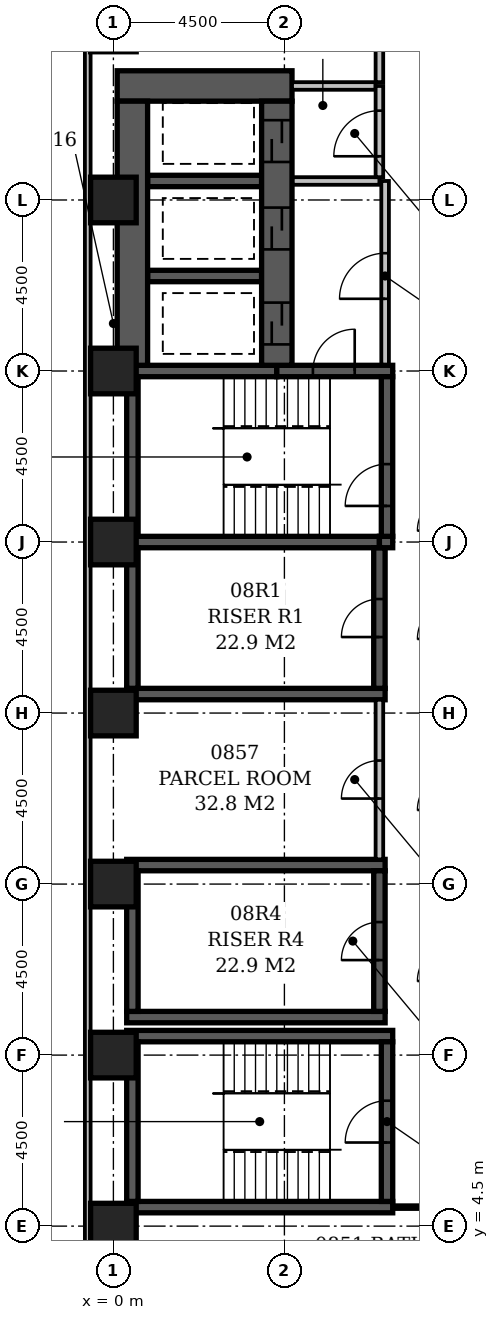
"""IFC4 building model, lengths in metres.
Left out: names, types, materials, properties, quantities, classifications, styles, units other than length and angle.
Written with IfcOpenShell. Run it as: python <this file> out.ifc"""

import sys

from ifc_helpers import new_model, si_unit, direction, frame, frame_2d, origin, origin_2d, place, context, subcontext, project, spatial, rectangle, extrude, element, fill, save


model = new_model("IFC4")
c1 = context("Model", 3, precision=1e-05, world=origin(), true_north=direction((0.0, 1.0)))
c2 = subcontext(c1, "Body", "Model", "MODEL_VIEW")
j1 = project(units=[si_unit("LENGTHUNIT", "METRE"), si_unit("PLANEANGLEUNIT", "RADIAN")], contexts=[c1])
p1 = place(None, origin())
s1 = spatial("IfcSite", under=j1, at=p1, CompositionType="ELEMENT")
p2 = place(p1, origin())
s2 = spatial("IfcBuilding", under=s1, at=p2, CompositionType="ELEMENT")
p3 = place(p2, frame((0.0, 0.0, 39.8)))
s3 = spatial("IfcBuildingStorey", under=s2, at=p3, CompositionType="ELEMENT", Elevation=39.8)
p4 = place(p3, frame((0.1, 34.5, -0.3), z_axis=(0.0, 0.0, 1.0), x_axis=(1.0, 0.0, 0.0)))
e1 = element("IfcWall", 1, at=p4, inside=s3, PredefinedType="SHEAR", context=c2, shape_type="SweptSolid", body=[
    extrude(rectangle(XDim=4.6, YDim=0.8, at=frame_2d((2.3, 0.0))), origin(), (0.0, 0.0, 1.0), 3.6),
])
for number, where, z_axis, x_axis in (
    (2, (0.35, 5.0, -0.3), (0.0, 0.0, 1.0), (1.0, 0.0, 0.0)),
    (3, (0.35, 9.5, -0.3), (0.0, 0.0, 1.0), (1.0, 0.0, 0.0)),
):
    element("IfcWall", number, at=place(p3, frame(where, z_axis=z_axis, x_axis=x_axis)), inside=s3, PredefinedType="SHEAR", context=c2, shape_type="SweptSolid", body=[
        extrude(rectangle(XDim=7.0, YDim=0.3, at=frame_2d((3.5, 0.0))), origin(), (0.0, 0.0, 1.0), 3.6),
    ])
for number, where, z_axis, x_axis in (
    (4, (0.35, 10.0, -0.3), (0.0, 0.0, 1.0), (1.0, 0.0, 0.0)),
    (5, (0.35, 14.0, -0.3), (0.0, 0.0, 1.0), (1.0, 0.0, 0.0)),
    (6, (0.35, 18.5, -0.3), (0.0, 0.0, 1.0), (1.0, 0.0, 0.0)),
):
    element("IfcWall", number, at=place(p3, frame(where, z_axis=z_axis, x_axis=x_axis)), inside=s3, PredefinedType="SHEAR", context=c2, shape_type="SweptSolid", body=[
        extrude(rectangle(XDim=6.8, YDim=0.3, at=frame_2d((3.4, 0.0))), origin(), (0.0, 0.0, 1.0), 3.6),
    ])
p5 = place(p3, frame((0.35, 22.5, -0.3), z_axis=(0.0, 0.0, 1.0), x_axis=(1.0, 0.0, 0.0)))
e7 = element("IfcWall", 7, at=p5, inside=s3, PredefinedType="SHEAR", context=c2, shape_type="SweptSolid", body=[
    extrude(rectangle(XDim=6.65, YDim=0.3, at=frame_2d((3.325, 0.0))), origin(), (0.0, 0.0, 1.0), 3.6),
])
p6 = place(p3, frame((0.35, 27.0, -0.3), z_axis=(0.0, 0.0, 1.0), x_axis=(1.0, 0.0, 0.0)))
e8 = element("IfcWall", 8, at=p6, inside=s3, PredefinedType="SHEAR", context=c2, shape_type="SweptSolid", body=[
    extrude(rectangle(XDim=3.95, YDim=0.3, at=frame_2d((1.975, 0.0))), origin(), (0.0, 0.0, 1.0), 3.6),
])
p7 = place(p3, frame((0.5, 5.15, -0.3), z_axis=(0.0, 0.0, 1.0), x_axis=(0.0, 1.0, 0.0)))
e9 = element("IfcWall", 9, at=p7, inside=s3, PredefinedType="SHEAR", context=c2, shape_type="SweptSolid", body=[
    extrude(rectangle(XDim=4.2, YDim=0.3, at=frame_2d((2.1, 0.0))), origin(), (0.0, 0.0, 1.0), 3.6),
])
for number, where, z_axis, x_axis in (
    (10, (0.5, 10.15, -0.3), (0.0, 0.0, 1.0), (0.0, 1.0, 0.0)),
    (11, (0.5, 18.65, -0.3), (0.0, 0.0, 1.0), (0.0, 1.0, 0.0)),
):
    element("IfcWall", number, at=place(p3, frame(where, z_axis=z_axis, x_axis=x_axis)), inside=s3, PredefinedType="SHEAR", context=c2, shape_type="SweptSolid", body=[
        extrude(rectangle(XDim=3.7, YDim=0.3, at=frame_2d((1.85, 0.0))), origin(), (0.0, 0.0, 1.0), 3.6),
    ])
p8 = place(p3, frame((0.5, 22.65, -0.3), z_axis=(0.0, 0.0, 1.0), x_axis=(0.0, 1.0, 0.0)))
e12 = element("IfcWall", 12, at=p8, inside=s3, PredefinedType="SHEAR", context=c2, shape_type="SweptSolid", body=[
    extrude(rectangle(XDim=4.2, YDim=0.3, at=frame_2d((2.1, 0.0))), origin(), (0.0, 0.0, 1.0), 3.6),
])
p9 = place(p3, frame((0.5, 27.15, -0.3), z_axis=(0.0, 0.0, 1.0), x_axis=(0.0, 1.0, 0.0)))
e13 = element("IfcWall", 13, at=p9, inside=s3, PredefinedType="SHEAR", context=c2, shape_type="SweptSolid", body=[
    extrude(rectangle(XDim=6.95, YDim=0.8, at=frame_2d((3.475, 0.0))), origin(), (0.0, 0.0, 1.0), 3.6),
])
for number, where, z_axis, x_axis in (
    (14, (0.9, 29.5, -0.3), (0.0, 0.0, 1.0), (1.0, 0.0, 0.0)),
    (15, (0.9, 32.0, -0.3), (0.0, 0.0, 1.0), (1.0, 0.0, 0.0)),
):
    element("IfcWall", number, at=place(p3, frame(where, z_axis=z_axis, x_axis=x_axis)), inside=s3, PredefinedType="SHEAR", context=c2, shape_type="SweptSolid", body=[
        extrude(rectangle(XDim=3.0, YDim=0.3, at=frame_2d((1.5, 0.0))), origin(), (0.0, 0.0, 1.0), 3.6),
    ])
p10 = place(p3, frame((4.3, 27.0, -0.3), z_axis=(0.0, 0.0, 1.0), x_axis=(1.0, 0.0, 0.0)))
e16 = element("IfcWall", 16, at=p10, inside=s3, PredefinedType="SHEAR", context=c2, shape_type="SweptSolid", body=[
    extrude(rectangle(XDim=3.05, YDim=0.3, at=frame_2d((1.525, 0.0))), origin(), (0.0, 0.0, 1.0), 3.6),
])
p11 = place(p10, frame((0.95, 0.0, 0.3)))
e17 = element("IfcOpeningElement", 17, at=p11, cuts=e16, PredefinedType="OPENING", context=c2, shape_type="SweptSolid", body=[
    extrude(rectangle(XDim=1.1, YDim=2.1, at=frame_2d((0.55, 1.05))), frame((0.0, 0.162, 0.0), z_axis=(0.0, -1.0, 0.0), x_axis=(1.0, 0.0, 0.0)), (0.0, 0.0, 1.0), 0.324),
])
p12 = place(p3, frame((4.3, 27.15, -0.3), z_axis=(0.0, 0.0, 1.0), x_axis=(0.0, 1.0, 0.0)))
e18 = element("IfcWall", 18, at=p12, inside=s3, PredefinedType="SHEAR", context=c2, shape_type="SweptSolid", body=[
    extrude(rectangle(XDim=6.95, YDim=0.8, at=frame_2d((3.475, 0.0))), origin(), (0.0, 0.0, 1.0), 3.6),
])
p13 = place(p12, frame((3.05, 0.0, 0.3)))
e19 = element("IfcOpeningElement", 19, at=p13, cuts=e18, PredefinedType="OPENING", context=c2, shape_type="SweptSolid", body=[
    extrude(rectangle(XDim=1.1, YDim=2.1, at=frame_2d((0.55, 1.05))), frame((0.0, 0.412, 0.0), z_axis=(0.0, -1.0, 0.0), x_axis=(1.0, 0.0, 0.0)), (0.0, 0.0, 1.0), 0.824),
])
p14 = place(p12, frame((0.55, 0.0, 0.3)))
e20 = element("IfcOpeningElement", 20, at=p14, cuts=e18, PredefinedType="OPENING", context=c2, shape_type="SweptSolid", body=[
    extrude(rectangle(XDim=1.1, YDim=2.1, at=frame_2d((0.55, 1.05))), frame((0.0, 0.412, 0.0), z_axis=(0.0, -1.0, 0.0), x_axis=(1.0, 0.0, 0.0)), (0.0, 0.0, 1.0), 0.824),
])
p15 = place(p12, frame((5.35, 0.0, 0.3)))
e21 = element("IfcOpeningElement", 21, at=p15, cuts=e18, PredefinedType="OPENING", context=c2, shape_type="SweptSolid", body=[
    extrude(rectangle(XDim=1.1, YDim=2.1, at=frame_2d((0.55, 1.05))), frame((0.0, 0.412, 0.0), z_axis=(0.0, -1.0, 0.0), x_axis=(1.0, 0.0, 0.0)), (0.0, 0.0, 1.0), 0.824),
])
p16 = place(p3, frame((7.0, 10.15, -0.3), z_axis=(0.0, 0.0, 1.0), x_axis=(0.0, 1.0, 0.0)))
e22 = element("IfcWall", 22, at=p16, inside=s3, PredefinedType="SHEAR", context=c2, shape_type="SweptSolid", body=[
    extrude(rectangle(XDim=3.7, YDim=0.3, at=frame_2d((1.85, 0.0))), origin(), (0.0, 0.0, 1.0), 3.6),
])
p17 = place(p16, frame((1.35, 0.0, 0.3)))
e23 = element("IfcOpeningElement", 23, at=p17, cuts=e22, PredefinedType="OPENING", context=c2, shape_type="SweptSolid", body=[
    extrude(rectangle(XDim=1.0, YDim=2.1, at=frame_2d((0.5, 1.05))), frame((0.0, 0.162, 0.0), z_axis=(0.0, -1.0, 0.0), x_axis=(1.0, 0.0, 0.0)), (0.0, 0.0, 1.0), 0.324),
])
p18 = place(p3, frame((7.0, 18.65, -0.3), z_axis=(0.0, 0.0, 1.0), x_axis=(0.0, 1.0, 0.0)))
e24 = element("IfcWall", 24, at=p18, inside=s3, PredefinedType="SHEAR", context=c2, shape_type="SweptSolid", body=[
    extrude(rectangle(XDim=3.7, YDim=0.3, at=frame_2d((1.85, 0.0))), origin(), (0.0, 0.0, 1.0), 3.6),
])
p19 = place(p18, frame((1.35, 0.0, 0.3)))
e25 = element("IfcOpeningElement", 25, at=p19, cuts=e24, PredefinedType="OPENING", context=c2, shape_type="SweptSolid", body=[
    extrude(rectangle(XDim=1.0, YDim=2.1, at=frame_2d((0.5, 1.05))), frame((0.0, 0.162, 0.0), z_axis=(0.0, -1.0, 0.0), x_axis=(1.0, 0.0, 0.0)), (0.0, 0.0, 1.0), 0.324),
])
p20 = place(p3, frame((7.0, 22.5, -0.3), z_axis=(0.0, 0.0, 1.0), x_axis=(1.0, 0.0, 0.0)))
e26 = element("IfcWall", 26, at=p20, inside=s3, PredefinedType="SHEAR", context=c2, shape_type="SweptSolid", body=[
    extrude(rectangle(XDim=0.35, YDim=0.3, at=frame_2d((0.175, 0.0))), origin(), (0.0, 0.0, 1.0), 3.6),
])
p21 = place(p3, frame((7.2, 5.15, -0.3), z_axis=(0.0, 0.0, 1.0), x_axis=(0.0, 1.0, 0.0)))
e27 = element("IfcWall", 27, at=p21, inside=s3, PredefinedType="SHEAR", context=c2, shape_type="SweptSolid", body=[
    extrude(rectangle(XDim=4.2, YDim=0.3, at=frame_2d((2.1, 0.0))), origin(), (0.0, 0.0, 1.0), 3.6),
])
p22 = place(p21, frame((1.55, 0.0, 0.3)))
e28 = element("IfcOpeningElement", 28, at=p22, cuts=e27, PredefinedType="OPENING", context=c2, shape_type="SweptSolid", body=[
    extrude(rectangle(XDim=1.1, YDim=2.1, at=frame_2d((0.55, 1.05))), frame((0.0, 0.162, 0.0), z_axis=(0.0, -1.0, 0.0), x_axis=(1.0, 0.0, 0.0)), (0.0, 0.0, 1.0), 0.324),
])
p23 = place(p3, frame((7.2, 22.65, -0.3), z_axis=(0.0, 0.0, 1.0), x_axis=(0.0, 1.0, 0.0)))
e29 = element("IfcWall", 29, at=p23, inside=s3, PredefinedType="SHEAR", context=c2, shape_type="SweptSolid", body=[
    extrude(rectangle(XDim=4.2, YDim=0.3, at=frame_2d((2.1, 0.0))), origin(), (0.0, 0.0, 1.0), 3.6),
])
p24 = place(p23, frame((0.8, 0.0, 0.3)))
e30 = element("IfcOpeningElement", 30, at=p24, cuts=e29, PredefinedType="OPENING", context=c2, shape_type="SweptSolid", body=[
    extrude(rectangle(XDim=1.1, YDim=2.1, at=frame_2d((0.55, 1.05))), frame((0.0, 0.162, 0.0), z_axis=(0.0, -1.0, 0.0), x_axis=(1.0, 0.0, 0.0)), (0.0, 0.0, 1.0), 0.324),
])
for number, where, z_axis, x_axis in (
    (31, (0.0, 4.5, -0.3), (0.0, 0.0, 1.0), (1.0, 0.0, 0.0)),
    (32, (0.0, 9.0, -0.3), (0.0, 0.0, 1.0), (1.0, 0.0, 0.0)),
    (33, (0.0, 13.5, -0.3), (0.0, 0.0, 1.0), (1.0, 0.0, 0.0)),
    (34, (0.0, 18.0, -0.3), (0.0, 0.0, 1.0), (1.0, 0.0, 0.0)),
    (35, (0.0, 22.5, -0.3), (0.0, 0.0, 1.0), (1.0, 0.0, 0.0)),
    (36, (0.0, 27.0, -0.3), (0.0, 0.0, 1.0), (1.0, 0.0, 0.0)),
    (37, (0.0, 31.5, -0.3), (0.0, 0.0, 1.0), (1.0, 0.0, 0.0)),
):
    element("IfcColumn", number, at=place(p3, frame(where, z_axis=z_axis, x_axis=x_axis)), inside=s3, PredefinedType="COLUMN", context=c2, shape_type="SweptSolid", body=[
        extrude(rectangle(XDim=1.2, YDim=1.2, at=origin_2d()), origin(), (0.0, 0.0, 1.0), 3.6),
    ])
p25 = place(p3, frame((-0.675, 59.1, 0.0), z_axis=(0.0, 0.0, 1.0), x_axis=(0.0, -1.0, 0.0)))
e38 = element("IfcWall", 38, at=p25, inside=s3, PredefinedType="STANDARD", context=c2, shape_type="SweptSolid", body=[
    extrude(rectangle(XDim=55.35, YDim=0.15, at=frame_2d((27.675, 0.0))), origin(), (0.0, 0.0, 1.0), 2.7),
])
p26 = place(p25, frame((10.65, 0.0, 0.6)))
e39 = element("IfcOpeningElement", 39, at=p26, cuts=e38, PredefinedType="OPENING", context=c2, shape_type="SweptSolid", body=[
    extrude(rectangle(XDim=2.4, YDim=1.8, at=frame_2d((1.2, 0.9))), frame((0.0, 0.087, 0.0), z_axis=(0.0, -1.0, 0.0), x_axis=(1.0, 0.0, 0.0)), (0.0, 0.0, 1.0), 0.174),
])
p27 = place(p25, frame((15.15, 0.0, 0.6)))
e40 = element("IfcOpeningElement", 40, at=p27, cuts=e38, PredefinedType="OPENING", context=c2, shape_type="SweptSolid", body=[
    extrude(rectangle(XDim=2.4, YDim=1.8, at=frame_2d((1.2, 0.9))), frame((0.0, 0.087, 0.0), z_axis=(0.0, -1.0, 0.0), x_axis=(1.0, 0.0, 0.0)), (0.0, 0.0, 1.0), 0.174),
])
p28 = place(p25, frame((19.53, 0.0, 0.6)))
e41 = element("IfcOpeningElement", 41, at=p28, cuts=e38, PredefinedType="OPENING", context=c2, shape_type="SweptSolid", body=[
    extrude(rectangle(XDim=1.5, YDim=1.8, at=frame_2d((0.75, 0.9))), frame((0.0, 0.087, 0.0), z_axis=(0.0, -1.0, 0.0), x_axis=(1.0, 0.0, 0.0)), (0.0, 0.0, 1.0), 0.174),
])
p29 = place(p3, frame((4.72, 32.0, 0.0), z_axis=(0.0, 0.0, 1.0), x_axis=(1.0, 0.0, 0.0)))
e42 = element("IfcWall", 42, at=p29, inside=s3, PredefinedType="PARTITIONING", context=c2, shape_type="SweptSolid", body=[
    extrude(rectangle(XDim=2.28, YDim=0.2, at=frame_2d((1.14, 0.0))), origin(), (0.0, 0.0, 1.0), 3.3),
])
p30 = place(p3, frame((7.0, 32.1, 0.0), z_axis=(0.0, 0.0, 1.0), x_axis=(0.0, 1.0, 0.0)))
e43 = element("IfcWall", 43, at=p30, inside=s3, PredefinedType="PARTITIONING", context=c2, shape_type="SweptSolid", body=[
    extrude(rectangle(XDim=2.4, YDim=0.2, at=frame_2d((1.2, 0.0))), origin(), (0.0, 0.0, 1.0), 3.3),
])
p31 = place(p30, frame((0.55, 0.0, 0.0)))
e44 = element("IfcOpeningElement", 44, at=p31, cuts=e43, PredefinedType="OPENING", context=c2, shape_type="SweptSolid", body=[
    extrude(rectangle(XDim=1.2, YDim=2.1, at=frame_2d((0.6, 1.05))), frame((0.0, 0.112, 0.0), z_axis=(0.0, -1.0, 0.0), x_axis=(1.0, 0.0, 0.0)), (0.0, 0.0, 1.0), 0.224),
])
p32 = place(p3, frame((4.7, 34.5, 0.0), z_axis=(0.0, 0.0, 1.0), x_axis=(1.0, 0.0, 0.0)))
e45 = element("IfcWall", 45, at=p32, inside=s3, PredefinedType="PARTITIONING", context=c2, shape_type="SweptSolid", body=[
    extrude(rectangle(XDim=2.2, YDim=0.2, at=frame_2d((1.1, 0.0))), origin(), (0.0, 0.0, 1.0), 3.3),
])
p33 = place(p3, frame((7.15, 27.17, 0.0), z_axis=(0.0, 0.0, 1.0), x_axis=(0.0, 1.0, 0.0)))
e46 = element("IfcWall", 46, at=p33, inside=s3, PredefinedType="PARTITIONING", context=c2, shape_type="SweptSolid", body=[
    extrude(rectangle(XDim=4.83, YDim=0.2, at=frame_2d((2.415, 0.0))), origin(), (0.0, 0.0, 1.0), 3.3),
])
p34 = place(p33, frame((1.73, 0.0, 0.0)))
e47 = element("IfcOpeningElement", 47, at=p34, cuts=e46, PredefinedType="OPENING", context=c2, shape_type="SweptSolid", body=[
    extrude(rectangle(XDim=1.2, YDim=2.1, at=frame_2d((0.6, 1.05))), frame((0.0, 0.112, 0.0), z_axis=(0.0, -1.0, 0.0), x_axis=(1.0, 0.0, 0.0)), (0.0, 0.0, 1.0), 0.224),
])
p35 = place(p3, frame((0.0, 4.4, 0.0), z_axis=(0.0, 0.0, 1.0), x_axis=(0.0, 1.0, 0.0)))
e48 = element("IfcWall", 48, at=p35, inside=s3, PredefinedType="PARTITIONING", context=c2, shape_type="SweptSolid", body=[
    extrude(rectangle(XDim=0.7, YDim=0.1, at=frame_2d((0.35, 0.0))), origin(), (0.0, 0.0, 1.0), 2.7),
])
p36 = place(p3, frame((7.349, 5.0, 0.0), z_axis=(0.0, 0.0, 1.0), x_axis=(1.0, 0.0, 0.0)))
e49 = element("IfcWall", 49, at=p36, inside=s3, PredefinedType="PARTITIONING", context=c2, shape_type="SweptSolid", body=[
    extrude(rectangle(XDim=1.551, YDim=0.1, at=frame_2d((0.775, 0.0))), origin(), (0.0, 0.0, 1.0), 3.3),
])
p37 = place(p3, frame((7.0, 14.15, 0.0), z_axis=(0.0, 0.0, 1.0), x_axis=(0.0, 1.0, 0.0)))
e50 = element("IfcWall", 50, at=p37, inside=s3, PredefinedType="PARTITIONING", context=c2, shape_type="SweptSolid", body=[
    extrude(rectangle(XDim=4.2, YDim=0.2, at=frame_2d((2.1, 0.0))), origin(), (0.0, 0.0, 1.0), 3.3),
])
p38 = place(p37, frame((1.6, 0.0, 0.0)))
e51 = element("IfcOpeningElement", 51, at=p38, cuts=e50, PredefinedType="OPENING", context=c2, shape_type="SweptSolid", body=[
    extrude(rectangle(XDim=1.0, YDim=2.1, at=frame_2d((0.5, 1.05))), frame((0.0, 0.112, 0.0), z_axis=(0.0, -1.0, 0.0), x_axis=(1.0, 0.0, 0.0)), (0.0, 0.0, 1.0), 0.224),
])
p39 = place(p3, frame((7.0, 34.6, 0.0), z_axis=(0.0, 0.0, 1.0), x_axis=(0.0, 1.0, 0.0)))
e52 = element("IfcWall", 52, at=p39, inside=s3, PredefinedType="PARTITIONING", context=c2, shape_type="SweptSolid", body=[
    extrude(rectangle(XDim=14.8, YDim=0.2, at=frame_2d((7.4, 0.0))), origin(), (0.0, 0.0, 1.0), 3.3),
])
p40 = place(p39, frame((2.775, 0.0, 0.0)))
e53 = element("IfcOpeningElement", 53, at=p40, cuts=e52, PredefinedType="OPENING", context=c2, shape_type="SweptSolid", body=[
    extrude(rectangle(XDim=0.9, YDim=2.1, at=frame_2d((0.45, 1.05))), frame((0.0, 0.112, 0.0), z_axis=(0.0, -1.0, 0.0), x_axis=(1.0, 0.0, 0.0)), (0.0, 0.0, 1.0), 0.224),
])
p41 = place(p39, frame((10.275, 0.0, 0.0)))
e54 = element("IfcOpeningElement", 54, at=p41, cuts=e52, PredefinedType="OPENING", context=c2, shape_type="SweptSolid", body=[
    extrude(rectangle(XDim=0.9, YDim=2.1, at=frame_2d((0.45, 1.05))), frame((0.0, 0.112, 0.0), z_axis=(0.0, -1.0, 0.0), x_axis=(1.0, 0.0, 0.0)), (0.0, 0.0, 1.0), 0.224),
])
p42 = place(p34, origin())
e55 = element("IfcDoor", 55, at=p42, inside=s3, OperationType="SINGLE_SWING_LEFT", PredefinedType="DOOR", context=c2, shape_type="SweptSolid", body=[
    extrude(rectangle(XDim=1.2, YDim=2.1, at=frame_2d((0.6, 1.05))), frame((0.0, 0.025, 0.0), z_axis=(0.0, -1.0, 0.0), x_axis=(1.0, 0.0, 0.0)), (0.0, 0.0, 1.0), 0.05),
])
fill(e47, e55)
p43 = place(p13, origin())
e56 = element("IfcDoor", 56, at=p43, inside=s3, OperationType="SLIDING_TO_LEFT", PredefinedType="DOOR", context=c2, shape_type="SweptSolid", body=[
    extrude(rectangle(XDim=1.1, YDim=2.1, at=frame_2d((0.55, 1.05))), frame((0.0, 0.025, 0.0), z_axis=(0.0, -1.0, 0.0), x_axis=(1.0, 0.0, 0.0)), (0.0, 0.0, 1.0), 0.05),
])
fill(e19, e56)
p44 = place(p14, origin())
e57 = element("IfcDoor", 57, at=p44, inside=s3, OperationType="SLIDING_TO_LEFT", PredefinedType="DOOR", context=c2, shape_type="SweptSolid", body=[
    extrude(rectangle(XDim=1.1, YDim=2.1, at=frame_2d((0.55, 1.05))), frame((0.0, 0.025, 0.0), z_axis=(0.0, -1.0, 0.0), x_axis=(1.0, 0.0, 0.0)), (0.0, 0.0, 1.0), 0.05),
])
fill(e20, e57)
p45 = place(p31, origin())
e58 = element("IfcDoor", 58, at=p45, inside=s3, OperationType="SINGLE_SWING_LEFT", PredefinedType="DOOR", context=c2, shape_type="SweptSolid", body=[
    extrude(rectangle(XDim=1.2, YDim=2.1, at=frame_2d((0.6, 1.05))), frame((0.0, 0.025, 0.0), z_axis=(0.0, -1.0, 0.0), x_axis=(1.0, 0.0, 0.0)), (0.0, 0.0, 1.0), 0.05),
])
fill(e44, e58)
p46 = place(p15, origin())
e59 = element("IfcDoor", 59, at=p46, inside=s3, OperationType="SLIDING_TO_LEFT", PredefinedType="DOOR", context=c2, shape_type="SweptSolid", body=[
    extrude(rectangle(XDim=1.1, YDim=2.1, at=frame_2d((0.55, 1.05))), frame((0.0, 0.025, 0.0), z_axis=(0.0, -1.0, 0.0), x_axis=(1.0, 0.0, 0.0)), (0.0, 0.0, 1.0), 0.05),
])
fill(e21, e59)
p47 = place(p19, origin())
e60 = element("IfcDoor", 60, at=p47, inside=s3, OperationType="SINGLE_SWING_LEFT", PredefinedType="DOOR", context=c2, shape_type="SweptSolid", body=[
    extrude(rectangle(XDim=1.0, YDim=2.1, at=frame_2d((0.5, 1.05))), frame((0.0, 0.025, 0.0), z_axis=(0.0, -1.0, 0.0), x_axis=(1.0, 0.0, 0.0)), (0.0, 0.0, 1.0), 0.05),
])
fill(e25, e60)
p48 = place(p17, origin())
e61 = element("IfcDoor", 61, at=p48, inside=s3, OperationType="SINGLE_SWING_LEFT", PredefinedType="DOOR", context=c2, shape_type="SweptSolid", body=[
    extrude(rectangle(XDim=1.0, YDim=2.1, at=frame_2d((0.5, 1.05))), frame((0.0, 0.025, 0.0), z_axis=(0.0, -1.0, 0.0), x_axis=(1.0, 0.0, 0.0)), (0.0, 0.0, 1.0), 0.05),
])
fill(e23, e61)
p49 = place(p11, frame((1.1, 0.0, 0.0), z_axis=(0.0, 0.0, 1.0), x_axis=(-1.0, 0.0, 0.0)))
e62 = element("IfcDoor", 62, at=p49, inside=s3, OperationType="SINGLE_SWING_LEFT", PredefinedType="DOOR", context=c2, shape_type="SweptSolid", body=[
    extrude(rectangle(XDim=1.1, YDim=2.1, at=frame_2d((0.55, 1.05))), frame((0.0, 0.025, 0.0), z_axis=(0.0, -1.0, 0.0), x_axis=(1.0, 0.0, 0.0)), (0.0, 0.0, 1.0), 0.05),
])
fill(e17, e62)
p50 = place(p24, origin())
e63 = element("IfcDoor", 63, at=p50, inside=s3, OperationType="SINGLE_SWING_LEFT", PredefinedType="DOOR", context=c2, shape_type="SweptSolid", body=[
    extrude(rectangle(XDim=1.1, YDim=2.1, at=frame_2d((0.55, 1.05))), frame((0.0, 0.025, 0.0), z_axis=(0.0, -1.0, 0.0), x_axis=(1.0, 0.0, 0.0)), (0.0, 0.0, 1.0), 0.05),
])
fill(e30, e63)
p51 = place(p22, origin())
e64 = element("IfcDoor", 64, at=p51, inside=s3, OperationType="SINGLE_SWING_LEFT", PredefinedType="DOOR", context=c2, shape_type="SweptSolid", body=[
    extrude(rectangle(XDim=1.1, YDim=2.1, at=frame_2d((0.55, 1.05))), frame((0.0, 0.025, 0.0), z_axis=(0.0, -1.0, 0.0), x_axis=(1.0, 0.0, 0.0)), (0.0, 0.0, 1.0), 0.05),
])
fill(e28, e64)
p52 = place(p38, origin())
e65 = element("IfcDoor", 65, at=p52, inside=s3, OperationType="SINGLE_SWING_LEFT", PredefinedType="DOOR", context=c2, shape_type="SweptSolid", body=[
    extrude(rectangle(XDim=1.0, YDim=2.1, at=frame_2d((0.5, 1.05))), frame((0.0, 0.025, 0.0), z_axis=(0.0, -1.0, 0.0), x_axis=(1.0, 0.0, 0.0)), (0.0, 0.0, 1.0), 0.05),
])
fill(e51, e65)
save(model, sys.argv[1])
